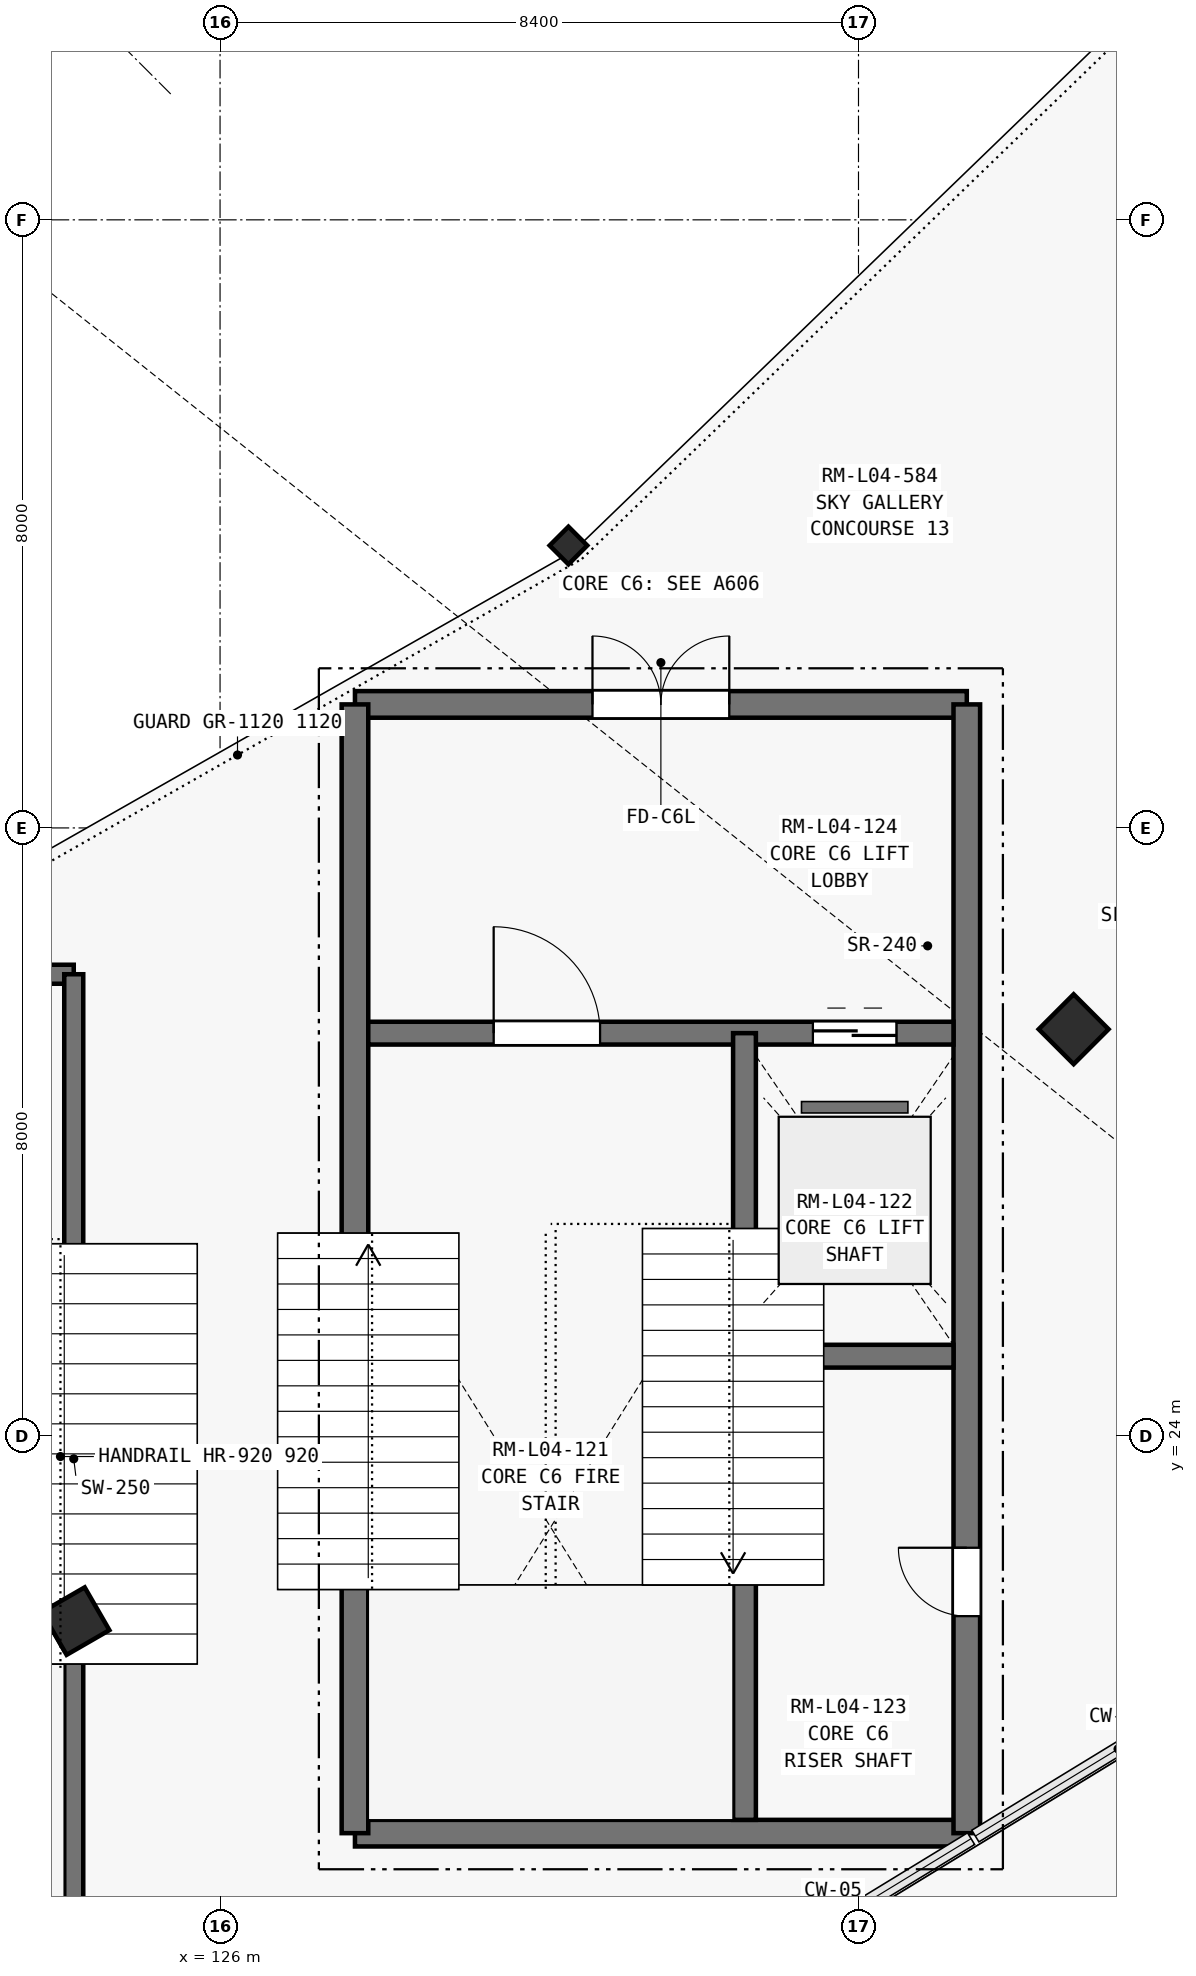
"""IFC4 building model, lengths in metres.
Left out: names, types, materials, properties, quantities, classifications, styles, units other than length and angle.
Written with IfcOpenShell. Run it as: python <this file> out.ifc"""

import sys

from ifc_helpers import new_model, si_unit, direction, frame, frame_2d, origin, origin_2d, place, context, subcontext, project, spatial, rectangle, i_section, extrude, element, fill, save


model = new_model("IFC4")
c1 = context("Model", 3, precision=1e-05, world=origin(), true_north=direction((0.0, 1.0)))
c2 = subcontext(c1, "Body", "Model", "MODEL_VIEW")
j1 = project(units=[si_unit("LENGTHUNIT", "METRE"), si_unit("PLANEANGLEUNIT", "RADIAN")], contexts=[c1])
p1 = place(None, origin())
s1 = spatial("IfcSite", under=j1, at=p1, CompositionType="ELEMENT")
p2 = place(p1, origin())
s2 = spatial("IfcBuilding", under=s1, at=p2, CompositionType="ELEMENT")
p3 = place(p2, frame((0.0, 0.0, 18.9)))
s3 = spatial("IfcBuildingStorey", under=s2, at=p3, CompositionType="ELEMENT", Elevation=18.9)
p4 = place(p3, frame((130.584, 35.716, 0.0), z_axis=(0.0, 0.0, 1.0), x_axis=(0.707106781187, -0.707106781187, 0.0)))
e1 = element("IfcColumn", 1, at=p4, inside=s3, PredefinedType="COLUMN", context=c2, shape_type="SweptSolid", body=[
    extrude(i_section(OverallWidth=0.35, OverallDepth=0.35, WebThickness=0.014, FlangeThickness=0.024, at=origin_2d()), origin(), (0.0, 0.0, 1.0), 4.5),
])
for number, where, z_axis, x_axis in (
    (2, (124.1, 21.565, 0.0), (0.0, 0.0, 1.0), (0.5, -0.866, 0.0)),
    (3, (137.231, 29.352, 0.0), (0.0, 0.0, 1.0), (0.707, -0.707, 0.0)),
):
    element("IfcColumn", number, at=place(p3, frame(where, z_axis=z_axis, x_axis=x_axis)), inside=s3, PredefinedType="COLUMN", context=c2, shape_type="SweptSolid", body=[
        extrude(rectangle(XDim=0.65, YDim=0.65, at=origin_2d()), origin(), (0.0, 0.0, 1.0), 4.5),
    ])
p5 = place(p3, frame((127.775, 18.775, 0.0), z_axis=(0.0, 0.0, 1.0), x_axis=(1.0, 0.0, 0.0)))
e4 = element("IfcWall", 4, at=p5, inside=s3, PredefinedType="SHEAR", context=c2, shape_type="SweptSolid", body=[
    extrude(rectangle(XDim=8.05, YDim=0.35, at=frame_2d((4.025, 0.0))), origin(), (0.0, 0.0, 1.0), 4.5),
])
p6 = place(p3, frame((127.775, 33.625, 0.0), z_axis=(0.0, 0.0, 1.0), x_axis=(1.0, 0.0, 0.0)))
e5 = element("IfcWall", 5, at=p6, inside=s3, PredefinedType="SHEAR", context=c2, shape_type="SweptSolid", body=[
    extrude(rectangle(XDim=8.05, YDim=0.35, at=frame_2d((4.025, 0.0))), origin(), (0.0, 0.0, 1.0), 4.5),
])
p7 = place(p6, frame((3.125, 0.0, 0.0)))
e6 = element("IfcOpeningElement", 6, at=p7, cuts=e5, PredefinedType="OPENING", context=c2, shape_type="SweptSolid", body=[
    extrude(rectangle(XDim=1.8, YDim=2.25, at=frame_2d((0.9, 1.125))), frame((0.0, 0.185, 0.0), z_axis=(0.0, -1.0, 0.0), x_axis=(1.0, 0.0, 0.0)), (0.0, 0.0, 1.0), 0.37),
])
p8 = place(p3, frame((127.775, 18.775, 0.0), z_axis=(0.0, 0.0, 1.0), x_axis=(0.0, 1.0, 0.0)))
e7 = element("IfcWall", 7, at=p8, inside=s3, PredefinedType="SHEAR", context=c2, shape_type="SweptSolid", body=[
    extrude(rectangle(XDim=14.85, YDim=0.35, at=frame_2d((7.425, 0.0))), origin(), (0.0, 0.0, 1.0), 4.5),
])
p9 = place(p3, frame((135.825, 18.775, 0.0), z_axis=(0.0, 0.0, 1.0), x_axis=(0.0, 1.0, 0.0)))
e8 = element("IfcWall", 8, at=p9, inside=s3, PredefinedType="SHEAR", context=c2, shape_type="SweptSolid", body=[
    extrude(rectangle(XDim=14.85, YDim=0.35, at=frame_2d((7.425, 0.0))), origin(), (0.0, 0.0, 1.0), 4.5),
])
p10 = place(p9, frame((2.855, 0.0, 0.0)))
e9 = element("IfcOpeningElement", 9, at=p10, cuts=e8, PredefinedType="OPENING", context=c2, shape_type="SweptSolid", body=[
    extrude(rectangle(XDim=0.9, YDim=2.1, at=frame_2d((0.45, 1.05))), frame((0.0, 0.185, 0.0), z_axis=(0.0, -1.0, 0.0), x_axis=(1.0, 0.0, 0.0)), (0.0, 0.0, 1.0), 0.37),
])
p11 = place(p3, frame((127.95, 29.3, 0.0), z_axis=(0.0, 0.0, 1.0), x_axis=(1.0, 0.0, 0.0)))
e10 = element("IfcWall", 10, at=p11, inside=s3, PredefinedType="SHEAR", context=c2, shape_type="SweptSolid", body=[
    extrude(rectangle(XDim=7.7, YDim=0.3, at=frame_2d((3.85, 0.0))), origin(), (0.0, 0.0, 1.0), 4.5),
])
p12 = place(p11, frame((1.65, 0.0, 0.0)))
e11 = element("IfcOpeningElement", 11, at=p12, cuts=e10, PredefinedType="OPENING", context=c2, shape_type="SweptSolid", body=[
    extrude(rectangle(XDim=1.4, YDim=2.2, at=frame_2d((0.7, 1.1))), frame((0.0, 0.16, 0.0), z_axis=(0.0, -1.0, 0.0), x_axis=(1.0, 0.0, 0.0)), (0.0, 0.0, 1.0), 0.32),
])
p13 = place(p11, frame((5.85, 0.0, 0.0)))
e12 = element("IfcOpeningElement", 12, at=p13, cuts=e10, PredefinedType="OPENING", context=c2, shape_type="SweptSolid", body=[
    extrude(rectangle(XDim=1.1, YDim=2.2, at=frame_2d((0.55, 1.1))), frame((0.0, 0.16, 0.0), z_axis=(0.0, -1.0, 0.0), x_axis=(1.0, 0.0, 0.0)), (0.0, 0.0, 1.0), 0.32),
])
p14 = place(p3, frame((132.9, 18.95, 0.0), z_axis=(0.0, 0.0, 1.0), x_axis=(0.0, 1.0, 0.0)))
e13 = element("IfcWall", 13, at=p14, inside=s3, PredefinedType="SHEAR", context=c2, shape_type="SweptSolid", body=[
    extrude(rectangle(XDim=10.35, YDim=0.3, at=frame_2d((5.175, 0.0))), origin(), (0.0, 0.0, 1.0), 4.5),
])
p15 = place(p3, frame((133.05, 25.05, 0.0), z_axis=(0.0, 0.0, 1.0), x_axis=(1.0, 0.0, 0.0)))
e14 = element("IfcWall", 14, at=p15, inside=s3, PredefinedType="SHEAR", context=c2, shape_type="SweptSolid", body=[
    extrude(rectangle(XDim=2.6, YDim=0.3, at=frame_2d((1.3, 0.0))), origin(), (0.0, 0.0, 1.0), 4.5),
])
p16 = place(p3, frame((116.725, 30.075, 0.0), z_axis=(0.0, 0.0, 1.0), x_axis=(1.0, 0.0, 0.0)))
e15 = element("IfcWall", 15, at=p16, inside=s3, PredefinedType="SHEAR", context=c2, shape_type="SweptSolid", body=[
    extrude(rectangle(XDim=7.35, YDim=0.25, at=frame_2d((3.675, 0.0))), origin(), (0.0, 0.0, 1.0), 4.5),
])
p17 = place(p16, frame((3.015, 0.0, 0.0)))
e16 = element("IfcOpeningElement", 16, at=p17, cuts=e15, PredefinedType="OPENING", context=c2, shape_type="SweptSolid", body=[
    extrude(rectangle(XDim=1.32, YDim=2.2, at=frame_2d((0.66, 1.1))), frame((0.0, 0.135, 0.0), z_axis=(0.0, -1.0, 0.0), x_axis=(1.0, 0.0, 0.0)), (0.0, 0.0, 1.0), 0.27),
])
p18 = place(p3, frame((124.075, 17.325, 0.0), z_axis=(0.0, 0.0, 1.0), x_axis=(0.0, 1.0, 0.0)))
e17 = element("IfcWall", 17, at=p18, inside=s3, PredefinedType="SHEAR", context=c2, shape_type="SweptSolid", body=[
    extrude(rectangle(XDim=12.75, YDim=0.25, at=frame_2d((6.375, 0.0))), origin(), (0.0, 0.0, 1.0), 4.5),
])
p19 = place(p7, origin())
e18 = element("IfcDoor", 18, at=p19, inside=s3, OperationType="DOUBLE_DOOR_SINGLE_SWING", PredefinedType="DOOR", context=c2, shape_type="SweptSolid", body=[
    extrude(rectangle(XDim=1.8, YDim=2.25, at=frame_2d((0.9, 1.125))), frame((0.0, 0.025, 0.0), z_axis=(0.0, -1.0, 0.0), x_axis=(1.0, 0.0, 0.0)), (0.0, 0.0, 1.0), 0.05),
])
fill(e6, e18)
p20 = place(p12, origin())
e19 = element("IfcDoor", 19, at=p20, inside=s3, OperationType="SINGLE_SWING_LEFT", PredefinedType="DOOR", context=c2, shape_type="SweptSolid", body=[
    extrude(rectangle(XDim=1.4, YDim=2.2, at=frame_2d((0.7, 1.1))), frame((0.0, 0.025, 0.0), z_axis=(0.0, -1.0, 0.0), x_axis=(1.0, 0.0, 0.0)), (0.0, 0.0, 1.0), 0.05),
])
fill(e11, e19)
p21 = place(p10, origin())
e20 = element("IfcDoor", 20, at=p21, inside=s3, OperationType="SINGLE_SWING_RIGHT", PredefinedType="DOOR", context=c2, shape_type="SweptSolid", body=[
    extrude(rectangle(XDim=0.9, YDim=2.1, at=frame_2d((0.45, 1.05))), frame((0.0, 0.025, 0.0), z_axis=(0.0, -1.0, 0.0), x_axis=(1.0, 0.0, 0.0)), (0.0, 0.0, 1.0), 0.05),
])
fill(e9, e20)
p22 = place(p13, origin())
e21 = element("IfcDoor", 21, at=p22, inside=s3, OperationType="SLIDING_TO_LEFT", PredefinedType="DOOR", context=c2, shape_type="SweptSolid", body=[
    extrude(rectangle(XDim=1.1, YDim=2.2, at=frame_2d((0.55, 1.1))), frame((0.0, 0.025, 0.0), z_axis=(0.0, -1.0, 0.0), x_axis=(1.0, 0.0, 0.0)), (0.0, 0.0, 1.0), 0.05),
])
fill(e12, e21)
save(model, sys.argv[1])
